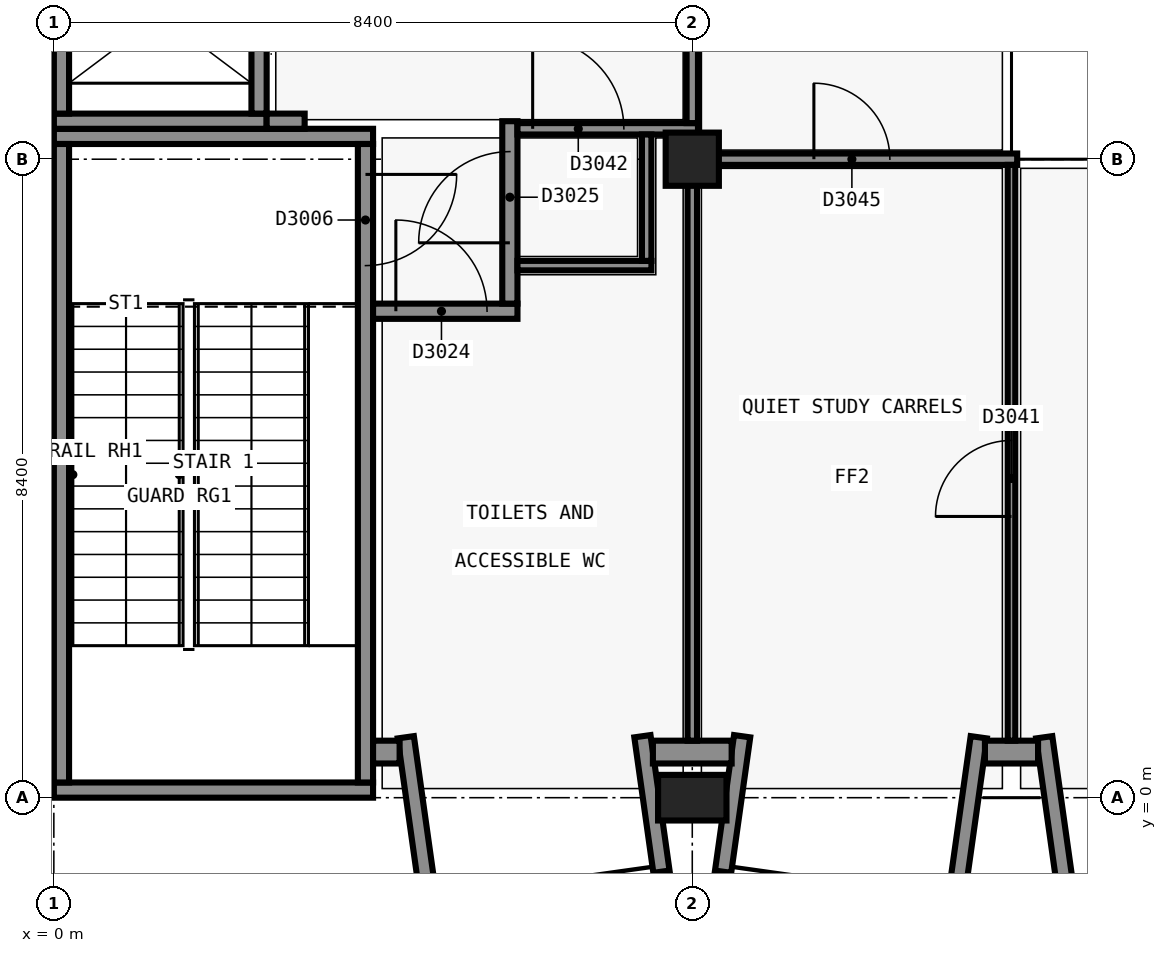
"""IFC4 building model, lengths in metres.
Left out: names, types, materials, properties, quantities, classifications, styles, units other than length and angle.
Written with IfcOpenShell. Run it as: python <this file> out.ifc"""

import sys

from ifc_helpers import new_model, si_unit, direction, frame, frame_2d, origin, origin_2d, place, context, subcontext, project, spatial, rectangle, extrude, element, fill, save


model = new_model("IFC4")
c1 = context("Model", 3, precision=1e-05, world=origin(), true_north=direction((0.0, 1.0)))
c2 = subcontext(c1, "Body", "Model", "MODEL_VIEW")
j1 = project(units=[si_unit("LENGTHUNIT", "METRE"), si_unit("PLANEANGLEUNIT", "RADIAN")], contexts=[c1])
p1 = place(None, origin())
s1 = spatial("IfcSite", under=j1, at=p1, CompositionType="ELEMENT")
p2 = place(p1, origin())
s2 = spatial("IfcBuilding", under=s1, at=p2, CompositionType="ELEMENT")
p3 = place(p2, frame((0.0, 0.0, 15.0)))
s3 = spatial("IfcBuildingStorey", under=s2, at=p3, CompositionType="ELEMENT", Elevation=15.0)
for number, where, z_axis, x_axis in (
    (1, (4.2, 0.1, 0.0), (0.0, 0.0, 1.0), (-1.0, 0.0, 0.0)),
    (2, (0.0, 8.7, 0.0), (0.0, 0.0, 1.0), (1.0, 0.0, 0.0)),
):
    element("IfcWall", number, at=place(p3, frame(where, z_axis=z_axis, x_axis=x_axis)), inside=s3, PredefinedType="SHEAR", context=c2, shape_type="SweptSolid", body=[
        extrude(rectangle(XDim=4.199, YDim=0.2, at=frame_2d((2.1, 0.0))), origin(), (0.0, 0.0, 1.0), 4.8),
    ])
p4 = place(p3, frame((0.1, 0.2, 0.0), z_axis=(0.0, 0.0, 1.0), x_axis=(0.0, 1.0, 0.0)))
e3 = element("IfcWall", 3, at=p4, inside=s3, PredefinedType="SHEAR", context=c2, shape_type="SweptSolid", body=[
    extrude(rectangle(XDim=8.4, YDim=0.2, at=frame_2d((4.2, 0.0))), origin(), (0.0, 0.0, 1.0), 4.8),
])
p5 = place(p3, frame((4.1, 8.6, 0.0), z_axis=(0.0, 0.0, 1.0), x_axis=(0.0, -1.0, 0.0)))
e4 = element("IfcWall", 4, at=p5, inside=s3, PredefinedType="SHEAR", context=c2, shape_type="SweptSolid", body=[
    extrude(rectangle(XDim=8.4, YDim=0.2, at=frame_2d((4.2, 0.0))), origin(), (0.0, 0.0, 1.0), 4.8),
])
p6 = place(p5, frame((0.4, 0.0, 0.0)))
e5 = element("IfcOpeningElement", 5, at=p6, cuts=e4, PredefinedType="OPENING", context=c2, shape_type="SweptSolid", body=[
    extrude(rectangle(XDim=1.2, YDim=2.1, at=frame_2d((0.6, 1.05))), frame((0.0, 0.11, 0.0), z_axis=(0.0, -1.0, 0.0), x_axis=(1.0, 0.0, 0.0)), (0.0, 0.0, 1.0), 0.22),
])
p7 = place(p3, frame((2.8, 8.9, 0.0), z_axis=(0.0, 0.0, 1.0), x_axis=(-1.0, 0.0, 0.0)))
e6 = element("IfcWall", 6, at=p7, inside=s3, PredefinedType="SHEAR", context=c2, shape_type="SweptSolid", body=[
    extrude(rectangle(XDim=2.8, YDim=0.2, at=frame_2d((1.4, 0.0))), origin(), (0.0, 0.0, 1.0), 4.8),
])
p8 = place(p3, frame((0.1, 9.0, 0.0), z_axis=(0.0, 0.0, 1.0), x_axis=(0.0, 1.0, 0.0)))
e7 = element("IfcWall", 7, at=p8, inside=s3, PredefinedType="SHEAR", context=c2, shape_type="SweptSolid", body=[
    extrude(rectangle(XDim=2.7, YDim=0.2, at=frame_2d((1.35, 0.0))), origin(), (0.0, 0.0, 1.0), 4.8),
])
p9 = place(p3, frame((2.7, 11.7, 0.0), z_axis=(0.0, 0.0, 1.0), x_axis=(0.0, -1.0, 0.0)))
e8 = element("IfcWall", 8, at=p9, inside=s3, PredefinedType="SHEAR", context=c2, shape_type="SweptSolid", body=[
    extrude(rectangle(XDim=2.7, YDim=0.2, at=frame_2d((1.35, 0.0))), origin(), (0.0, 0.0, 1.0), 4.8),
])
p10 = place(p9, frame((0.85, 0.0, 0.0)))
e9 = element("IfcOpeningElement", 9, at=p10, cuts=e8, PredefinedType="OPENING", context=c2, shape_type="SweptSolid", body=[
    extrude(rectangle(XDim=1.1, YDim=2.1, at=frame_2d((0.55, 1.05))), frame((0.0, 0.11, 0.0), z_axis=(0.0, -1.0, 0.0), x_axis=(1.0, 0.0, 0.0)), (0.0, 0.0, 1.0), 0.22),
])
p11 = place(p3, frame((8.4, 0.0, 0.0), z_axis=(0.0, 0.0, 1.0), x_axis=(1.0, 0.0, 0.0)))
e10 = element("IfcColumn", 10, at=p11, inside=s3, PredefinedType="COLUMN", context=c2, shape_type="SweptSolid", body=[
    extrude(rectangle(XDim=0.9, YDim=0.6, at=origin_2d()), origin(), (0.0, 0.0, 1.0), 4.8),
])
p12 = place(p3, frame((8.4, 8.4, 0.0), z_axis=(0.0, 0.0, 1.0), x_axis=(1.0, 0.0, 0.0)))
e11 = element("IfcColumn", 11, at=p12, inside=s3, PredefinedType="COLUMN", context=c2, shape_type="SweptSolid", body=[
    extrude(rectangle(XDim=0.7, YDim=0.7, at=origin_2d()), origin(), (0.0, 0.0, 1.0), 4.8),
])
p13 = place(p3, frame((3.3, 8.9, 0.0), z_axis=(0.0, 0.0, 1.0), x_axis=(-1.0, 0.0, 0.0)))
e12 = element("IfcWall", 12, at=p13, inside=s3, PredefinedType="SHEAR", context=c2, shape_type="SweptSolid", body=[
    extrude(rectangle(XDim=0.5, YDim=0.2, at=frame_2d((0.25, 0.0))), origin(), (0.0, 0.0, 1.0), 4.8),
])
p14 = place(p3, frame((4.631, 0.795, 0.0), z_axis=(0.0, 0.0, 1.0), x_axis=(0.139141913905, -0.990272451295, 0.0)))
e13 = element("IfcWall", 13, at=p14, inside=s3, PredefinedType="SOLIDWALL", context=c2, shape_type="SweptSolid", body=[
    extrude(rectangle(XDim=2.219, YDim=0.215, at=frame_2d((1.11, 0.0))), origin(), (0.0, 0.0, 1.0), 4.5),
])
for number, where, z_axis, x_axis in (
    (14, (7.744, 0.809, 0.0), (0.0, 0.0, 1.0), (0.139, -0.99, 0.0)),
    (15, (9.056, 0.809, 0.0), (0.0, 0.0, 1.0), (-0.139, -0.99, 0.0)),
):
    element("IfcWall", number, at=place(p3, frame(where, z_axis=z_axis, x_axis=x_axis)), inside=s3, PredefinedType="SOLIDWALL", context=c2, shape_type="SweptSolid", body=[
        extrude(rectangle(XDim=1.8, YDim=0.215, at=frame_2d((0.9, 0.0))), origin(), (0.0, 0.0, 1.0), 4.5),
    ])
p15 = place(p3, frame((12.169, 0.795, 0.0), z_axis=(0.0, 0.0, 1.0), x_axis=(-0.139141913905, -0.990272451295, 0.0)))
e16 = element("IfcWall", 16, at=p15, inside=s3, PredefinedType="SOLIDWALL", context=c2, shape_type="SweptSolid", body=[
    extrude(rectangle(XDim=2.219, YDim=0.215, at=frame_2d((1.11, 0.0))), origin(), (0.0, 0.0, 1.0), 4.5),
])
p16 = place(p3, frame((13.031, 0.795, 0.0), z_axis=(0.0, 0.0, 1.0), x_axis=(0.139249775508, -0.99025728981, 0.0)))
e17 = element("IfcWall", 17, at=p16, inside=s3, PredefinedType="SOLIDWALL", context=c2, shape_type="SweptSolid", body=[
    extrude(rectangle(XDim=2.22, YDim=0.215, at=frame_2d((1.11, 0.0))), origin(), (0.0, 0.0, 1.0), 4.5),
])
p17 = place(p3, frame((4.55, 0.6, 0.0), z_axis=(0.0, 0.0, 1.0), x_axis=(-1.0, 0.0, 0.0)))
e18 = element("IfcWall", 18, at=p17, inside=s3, PredefinedType="SOLIDWALL", context=c2, shape_type="SweptSolid", body=[
    extrude(rectangle(XDim=0.349, YDim=0.3, at=frame_2d((0.175, 0.0))), origin(), (0.0, 0.0, 1.0), 4.5),
])
p18 = place(p3, frame((8.918, 0.6, 0.0), z_axis=(0.0, 0.0, 1.0), x_axis=(-1.0, 0.0, 0.0)))
e19 = element("IfcWall", 19, at=p18, inside=s3, PredefinedType="SOLIDWALL", context=c2, shape_type="SweptSolid", body=[
    extrude(rectangle(XDim=1.036, YDim=0.3, at=frame_2d((0.518, 0.0))), origin(), (0.0, 0.0, 1.0), 4.5),
])
p19 = place(p3, frame((12.949, 0.6, 0.0), z_axis=(0.0, 0.0, 1.0), x_axis=(-1.0, 0.0, 0.0)))
e20 = element("IfcWall", 20, at=p19, inside=s3, PredefinedType="SOLIDWALL", context=c2, shape_type="SweptSolid", body=[
    extrude(rectangle(XDim=0.699, YDim=0.3, at=frame_2d((0.35, 0.0))), origin(), (0.0, 0.0, 1.0), 4.5),
])
p20 = place(p3, frame((4.2, 6.4, 0.0), z_axis=(0.0, 0.0, 1.0), x_axis=(1.0, 0.0, 0.0)))
e21 = element("IfcWall", 21, at=p20, inside=s3, PredefinedType="SOLIDWALL", context=c2, shape_type="SweptSolid", body=[
    extrude(rectangle(XDim=1.9, YDim=0.2, at=frame_2d((0.95, 0.0))), origin(), (0.0, 0.0, 1.0), 4.5),
])
p21 = place(p20, frame((0.3, 0.0, 0.0)))
e22 = element("IfcOpeningElement", 22, at=p21, cuts=e21, PredefinedType="OPENING", context=c2, shape_type="SweptSolid", body=[
    extrude(rectangle(XDim=1.2, YDim=2.1, at=frame_2d((0.6, 1.05))), frame((0.0, 0.11, 0.0), z_axis=(0.0, -1.0, 0.0), x_axis=(1.0, 0.0, 0.0)), (0.0, 0.0, 1.0), 0.22),
])
p22 = place(p3, frame((6.0, 6.5, 0.0), z_axis=(0.0, 0.0, 1.0), x_axis=(0.0, 1.0, 0.0)))
e23 = element("IfcWall", 23, at=p22, inside=s3, PredefinedType="SOLIDWALL", context=c2, shape_type="SweptSolid", body=[
    extrude(rectangle(XDim=2.4, YDim=0.2, at=frame_2d((1.2, 0.0))), origin(), (0.0, 0.0, 1.0), 4.0),
])
p23 = place(p22, frame((0.8, 0.0, 0.0)))
e24 = element("IfcOpeningElement", 24, at=p23, cuts=e23, PredefinedType="OPENING", context=c2, shape_type="SweptSolid", body=[
    extrude(rectangle(XDim=1.2, YDim=2.1, at=frame_2d((0.6, 1.05))), frame((0.0, 0.11, 0.0), z_axis=(0.0, -1.0, 0.0), x_axis=(1.0, 0.0, 0.0)), (0.0, 0.0, 1.0), 0.22),
])
p24 = place(p3, frame((8.325, 8.4, 0.0), z_axis=(0.0, 0.0, 1.0), x_axis=(1.0, 0.0, 0.0)))
e25 = element("IfcWall", 25, at=p24, inside=s3, PredefinedType="PARTITIONING", context=c2, shape_type="SweptSolid", body=[
    extrude(rectangle(XDim=4.35, YDim=0.15, at=frame_2d((2.175, 0.0))), origin(), (0.0, 0.0, 1.0), 3.8),
])
p25 = place(p24, frame((1.675, 0.0, 0.0)))
e26 = element("IfcOpeningElement", 26, at=p25, cuts=e25, PredefinedType="OPENING", context=c2, shape_type="SweptSolid", body=[
    extrude(rectangle(XDim=1.0, YDim=2.1, at=frame_2d((0.5, 1.05))), frame((0.0, 0.085, 0.0), z_axis=(0.0, -1.0, 0.0), x_axis=(1.0, 0.0, 0.0)), (0.0, 0.0, 1.0), 0.17),
])
p26 = place(p3, frame((6.1, 8.8, 0.0), z_axis=(0.0, 0.0, 1.0), x_axis=(1.0, 0.0, 0.0)))
e27 = element("IfcWall", 27, at=p26, inside=s3, PredefinedType="SOLIDWALL", context=c2, shape_type="SweptSolid", body=[
    extrude(rectangle(XDim=2.375, YDim=0.15, at=frame_2d((1.188, 0.0))), origin(), (0.0, 0.0, 1.0), 3.8),
])
p27 = place(p26, frame((0.2, 0.0, 0.0)))
e28 = element("IfcOpeningElement", 28, at=p27, cuts=e27, PredefinedType="OPENING", context=c2, shape_type="SweptSolid", body=[
    extrude(rectangle(XDim=1.2, YDim=2.1, at=frame_2d((0.6, 1.05))), frame((0.0, 0.085, 0.0), z_axis=(0.0, -1.0, 0.0), x_axis=(1.0, 0.0, 0.0)), (0.0, 0.0, 1.0), 0.17),
])
p28 = place(p3, frame((8.4, 8.475, 0.0), z_axis=(0.0, 0.0, 1.0), x_axis=(0.0, 1.0, 0.0)))
e29 = element("IfcWall", 29, at=p28, inside=s3, PredefinedType="PARTITIONING", context=c2, shape_type="SweptSolid", body=[
    extrude(rectangle(XDim=0.25, YDim=0.15, at=frame_2d((0.125, 0.0))), origin(), (0.0, 0.0, 1.0), 3.8),
])
p29 = place(p3, frame((8.4, 8.875, 0.0), z_axis=(0.0, 0.0, 1.0), x_axis=(0.0, 1.0, 0.0)))
e30 = element("IfcWall", 30, at=p29, inside=s3, PredefinedType="SOLIDWALL", context=c2, shape_type="SweptSolid", body=[
    extrude(rectangle(XDim=2.85, YDim=0.15, at=frame_2d((1.425, 0.0))), origin(), (0.0, 0.0, 1.0), 3.8),
])
p30 = place(p3, frame((6.1, 7.0, 0.0), z_axis=(0.0, 0.0, 1.0), x_axis=(1.0, 0.0, 0.0)))
e31 = element("IfcWall", 31, at=p30, inside=s3, PredefinedType="PARTITIONING", context=c2, shape_type="SweptSolid", body=[
    extrude(rectangle(XDim=1.762, YDim=0.125, at=frame_2d((0.881, 0.0))), origin(), (0.0, 0.0, 1.0), 4.5),
])
p31 = place(p3, frame((7.8, 7.062, 0.0), z_axis=(0.0, 0.0, 1.0), x_axis=(0.0, 1.0, 0.0)))
e32 = element("IfcWall", 32, at=p31, inside=s3, PredefinedType="PARTITIONING", context=c2, shape_type="SweptSolid", body=[
    extrude(rectangle(XDim=1.663, YDim=0.125, at=frame_2d((0.831, 0.0))), origin(), (0.0, 0.0, 1.0), 4.0),
])
p32 = place(p3, frame((8.4, 0.75, 0.0), z_axis=(0.0, 0.0, 1.0), x_axis=(0.0, 1.0, 0.0)))
e33 = element("IfcWall", 33, at=p32, inside=s3, PredefinedType="PARTITIONING", context=c2, shape_type="SweptSolid", body=[
    extrude(rectangle(XDim=7.575, YDim=0.125, at=frame_2d((3.788, 0.0))), origin(), (0.0, 0.0, 1.0), 3.8),
])
p33 = place(p3, frame((12.6, 0.75, 0.0), z_axis=(0.0, 0.0, 1.0), x_axis=(0.0, 1.0, 0.0)))
e34 = element("IfcWall", 34, at=p33, inside=s3, PredefinedType="PARTITIONING", context=c2, shape_type="SweptSolid", body=[
    extrude(rectangle(XDim=7.575, YDim=0.1, at=frame_2d((3.788, 0.0))), origin(), (0.0, 0.0, 1.0), 3.8),
])
p34 = place(p33, frame((2.95, 0.0, 0.0)))
e35 = element("IfcOpeningElement", 35, at=p34, cuts=e34, PredefinedType="OPENING", context=c2, shape_type="SweptSolid", body=[
    extrude(rectangle(XDim=1.0, YDim=2.1, at=frame_2d((0.5, 1.05))), frame((0.0, 0.06, 0.0), z_axis=(0.0, -1.0, 0.0), x_axis=(1.0, 0.0, 0.0)), (0.0, 0.0, 1.0), 0.12),
])
p35 = place(p10, origin())
e36 = element("IfcDoor", 36, at=p35, inside=s3, OperationType="SLIDING_TO_LEFT", PredefinedType="DOOR", context=c2, shape_type="SweptSolid", body=[
    extrude(rectangle(XDim=1.1, YDim=2.1, at=frame_2d((0.55, 1.05))), frame((0.0, 0.025, 0.0), z_axis=(0.0, -1.0, 0.0), x_axis=(1.0, 0.0, 0.0)), (0.0, 0.0, 1.0), 0.05),
])
fill(e9, e36)
p36 = place(p6, origin())
e37 = element("IfcDoor", 37, at=p36, inside=s3, OperationType="SINGLE_SWING_RIGHT", PredefinedType="DOOR", context=c2, shape_type="SweptSolid", body=[
    extrude(rectangle(XDim=1.2, YDim=2.1, at=frame_2d((0.6, 1.05))), frame((0.0, 0.025, 0.0), z_axis=(0.0, -1.0, 0.0), x_axis=(1.0, 0.0, 0.0)), (0.0, 0.0, 1.0), 0.05),
])
fill(e5, e37)
p37 = place(p21, origin())
e38 = element("IfcDoor", 38, at=p37, inside=s3, OperationType="SINGLE_SWING_LEFT", PredefinedType="DOOR", context=c2, shape_type="SweptSolid", body=[
    extrude(rectangle(XDim=1.2, YDim=2.1, at=frame_2d((0.6, 1.05))), frame((0.0, 0.025, 0.0), z_axis=(0.0, -1.0, 0.0), x_axis=(1.0, 0.0, 0.0)), (0.0, 0.0, 1.0), 0.05),
])
fill(e22, e38)
p38 = place(p23, origin())
e39 = element("IfcDoor", 39, at=p38, inside=s3, OperationType="SINGLE_SWING_RIGHT", PredefinedType="DOOR", context=c2, shape_type="SweptSolid", body=[
    extrude(rectangle(XDim=1.2, YDim=2.1, at=frame_2d((0.6, 1.05))), frame((0.0, 0.025, 0.0), z_axis=(0.0, -1.0, 0.0), x_axis=(1.0, 0.0, 0.0)), (0.0, 0.0, 1.0), 0.05),
])
fill(e24, e39)
p39 = place(p34, origin())
e40 = element("IfcDoor", 40, at=p39, inside=s3, OperationType="SINGLE_SWING_RIGHT", PredefinedType="DOOR", context=c2, shape_type="SweptSolid", body=[
    extrude(rectangle(XDim=1.0, YDim=2.1, at=frame_2d((0.5, 1.05))), frame((0.0, 0.025, 0.0), z_axis=(0.0, -1.0, 0.0), x_axis=(1.0, 0.0, 0.0)), (0.0, 0.0, 1.0), 0.05),
])
fill(e35, e40)
p40 = place(p27, origin())
e41 = element("IfcDoor", 41, at=p40, inside=s3, OperationType="SINGLE_SWING_RIGHT", PredefinedType="DOOR", context=c2, shape_type="SweptSolid", body=[
    extrude(rectangle(XDim=1.2, YDim=2.1, at=frame_2d((0.6, 1.05))), frame((0.0, 0.025, 0.0), z_axis=(0.0, -1.0, 0.0), x_axis=(1.0, 0.0, 0.0)), (0.0, 0.0, 1.0), 0.05),
])
fill(e28, e41)
p41 = place(p25, origin())
e42 = element("IfcDoor", 42, at=p41, inside=s3, OperationType="SINGLE_SWING_RIGHT", PredefinedType="DOOR", context=c2, shape_type="SweptSolid", body=[
    extrude(rectangle(XDim=1.0, YDim=2.1, at=frame_2d((0.5, 1.05))), frame((0.0, 0.025, 0.0), z_axis=(0.0, -1.0, 0.0), x_axis=(1.0, 0.0, 0.0)), (0.0, 0.0, 1.0), 0.05),
])
fill(e26, e42)
save(model, sys.argv[1])
